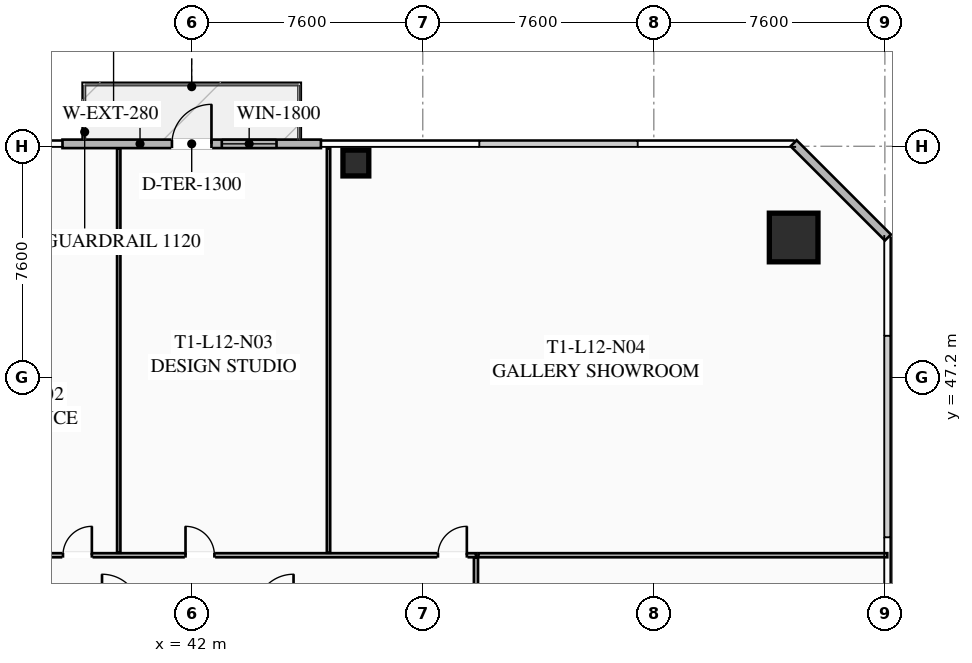
"""IFC4 building model, lengths in metres.
Left out: names, types, materials, properties, quantities, classifications, styles, units other than length and angle.
Written with IfcOpenShell. Run it as: python <this file> out.ifc"""

import sys

from ifc_helpers import new_model, si_unit, direction, frame, frame_2d, origin, origin_2d, place, context, subcontext, project, spatial, rectangle, hollow_rectangle, extrude, element, fill, save


model = new_model("IFC4")
c1 = context("Model", 3, precision=1e-05, world=origin(), true_north=direction((0.0, 1.0)))
c2 = subcontext(c1, "Body", "Model", "MODEL_VIEW")
j1 = project(units=[si_unit("LENGTHUNIT", "METRE"), si_unit("PLANEANGLEUNIT", "RADIAN")], contexts=[c1])
p1 = place(None, origin())
s1 = spatial("IfcSite", under=j1, at=p1, CompositionType="ELEMENT")
p2 = place(p1, origin())
s2 = spatial("IfcBuilding", under=s1, at=p2, CompositionType="ELEMENT")
p3 = place(p2, frame((0.0, 0.0, 49.45)))
s3 = spatial("IfcBuildingStorey", under=s2, at=p3, CompositionType="ELEMENT", Elevation=49.45)
p4 = place(p3, frame((61.8, 51.8, 0.0), z_axis=(0.0, 0.0, 1.0), x_axis=(1.0, 0.0, 0.0)))
e1 = element("IfcColumn", 1, at=p4, inside=s3, PredefinedType="COLUMN", context=c2, shape_type="SweptSolid", body=[
    extrude(hollow_rectangle(XDim=1.6, YDim=1.6, WallThickness=0.06, at=origin_2d()), origin(), (0.0, 0.0, 1.0), 3.35),
])
p5 = place(p3, frame((47.4, 54.25, 0.0), z_axis=(0.0, 0.0, 1.0), x_axis=(1.0, 0.0, 0.0)))
e2 = element("IfcColumn", 2, at=p5, inside=s3, PredefinedType="COLUMN", context=c2, shape_type="SweptSolid", body=[
    extrude(hollow_rectangle(XDim=0.85, YDim=0.85, WallThickness=0.035, at=origin_2d()), origin(), (0.0, 0.0, 1.0), 3.35),
])
p6 = place(p3, frame((37.75, 54.88, 0.0), z_axis=(0.0, 0.0, 1.0), x_axis=(1.0, 0.0, 0.0)))
e3 = element("IfcWall", 3, at=p6, inside=s3, PredefinedType="SOLIDWALL", context=c2, shape_type="SweptSolid", body=[
    extrude(rectangle(XDim=8.5, YDim=0.28, at=frame_2d((4.25, 0.0))), origin(), (0.0, 0.0, 1.0), 3.35),
])
p7 = place(p6, frame((3.6, 0.0, 0.0)))
e4 = element("IfcOpeningElement", 4, at=p7, cuts=e3, PredefinedType="OPENING", context=c2, shape_type="SweptSolid", body=[
    extrude(rectangle(XDim=1.3, YDim=2.15, at=frame_2d((0.65, 1.075))), frame((0.0, 0.15, 0.0), z_axis=(0.0, -1.0, 0.0), x_axis=(1.0, 0.0, 0.0)), (0.0, 0.0, 1.0), 0.3),
])
p8 = place(p6, frame((5.24, 0.0, 0.85)))
e5 = element("IfcOpeningElement", 5, at=p8, cuts=e3, PredefinedType="OPENING", context=c2, shape_type="SweptSolid", body=[
    extrude(rectangle(XDim=1.8, YDim=1.92, at=frame_2d((0.9, 0.96))), frame((0.0, 0.15, 0.0), z_axis=(0.0, -1.0, 0.0), x_axis=(1.0, 0.0, 0.0)), (0.0, 0.0, 1.0), 0.3),
])
p9 = place(p3, frame((61.8, 54.9, 0.0), z_axis=(0.0, 0.0, 1.0), x_axis=(0.707106781187, -0.707106781187, 0.0)))
e6 = element("IfcWall", 6, at=p9, inside=s3, PredefinedType="SOLIDWALL", context=c2, shape_type="SweptSolid", body=[
    extrude(rectangle(XDim=4.384, YDim=0.28, at=frame_2d((2.192, 0.0))), origin(), (0.0, 0.0, 1.0), 3.35),
])
p10 = place(p3, frame((22.35, 41.35, 0.0), z_axis=(0.0, 0.0, 1.0), x_axis=(1.0, 0.0, 0.0)))
e7 = element("IfcWall", 7, at=p10, inside=s3, PredefinedType="PARTITIONING", context=c2, shape_type="SweptSolid", body=[
    extrude(rectangle(XDim=29.0, YDim=0.135, at=frame_2d((14.5, 0.0))), origin(), (0.0, 0.0, 1.0), 2.703),
])
p11 = place(p10, frame((0.3, 0.0, 0.0)))
e8 = element("IfcOpeningElement", 8, at=p11, cuts=e7, PredefinedType="OPENING", context=c2, shape_type="SweptSolid", body=[
    extrude(rectangle(XDim=0.95, YDim=2.05, at=frame_2d((0.475, 1.025))), frame((0.0, 0.077, 0.0), z_axis=(0.0, -1.0, 0.0), x_axis=(1.0, 0.0, 0.0)), (0.0, 0.0, 1.0), 0.155),
])
p12 = place(p10, frame((15.416, 0.0, 0.0)))
e9 = element("IfcOpeningElement", 9, at=p12, cuts=e7, PredefinedType="OPENING", context=c2, shape_type="SweptSolid", body=[
    extrude(rectangle(XDim=0.95, YDim=2.05, at=frame_2d((0.475, 1.025))), frame((0.0, 0.077, 0.0), z_axis=(0.0, -1.0, 0.0), x_axis=(1.0, 0.0, 0.0)), (0.0, 0.0, 1.0), 0.155),
])
p13 = place(p10, frame((19.447, 0.0, 0.0)))
e10 = element("IfcOpeningElement", 10, at=p13, cuts=e7, PredefinedType="OPENING", context=c2, shape_type="SweptSolid", body=[
    extrude(rectangle(XDim=0.95, YDim=2.05, at=frame_2d((0.475, 1.025))), frame((0.0, 0.077, 0.0), z_axis=(0.0, -1.0, 0.0), x_axis=(1.0, 0.0, 0.0)), (0.0, 0.0, 1.0), 0.155),
])
p14 = place(p10, frame((27.75, 0.0, 0.0)))
e11 = element("IfcOpeningElement", 11, at=p14, cuts=e7, PredefinedType="OPENING", context=c2, shape_type="SweptSolid", body=[
    extrude(rectangle(XDim=0.95, YDim=2.05, at=frame_2d((0.475, 1.025))), frame((0.0, 0.077, 0.0), z_axis=(0.0, -1.0, 0.0), x_axis=(1.0, 0.0, 0.0)), (0.0, 0.0, 1.0), 0.155),
])
for number, where, z_axis, x_axis in (
    (12, (39.6, 41.43, 0.0), (0.0, 0.0, 1.0), (0.0, 1.0, 0.0)),
    (13, (46.5, 41.43, 0.0), (0.0, 0.0, 1.0), (0.0, 1.0, 0.0)),
):
    element("IfcWall", number, at=place(p3, frame(where, z_axis=z_axis, x_axis=x_axis)), inside=s3, PredefinedType="PARTITIONING", context=c2, shape_type="SweptSolid", body=[
        extrude(rectangle(XDim=13.3, YDim=0.11, at=frame_2d((6.65, 0.0))), origin(), (0.0, 0.0, 1.0), 2.703),
    ])
p15 = place(p3, frame((51.35, 41.27, 0.0), z_axis=(0.0, 0.0, 1.0), x_axis=(0.0, -1.0, 0.0)))
e14 = element("IfcWall", 14, at=p15, inside=s3, PredefinedType="PARTITIONING", context=c2, shape_type="SweptSolid", body=[
    extrude(rectangle(XDim=19.71, YDim=0.135, at=frame_2d((9.855, 0.0))), origin(), (0.0, 0.0, 1.0), 2.703),
])
p16 = place(p15, frame((18.46, 0.0, 0.0)))
e15 = element("IfcOpeningElement", 15, at=p16, cuts=e14, PredefinedType="OPENING", context=c2, shape_type="SweptSolid", body=[
    extrude(rectangle(XDim=0.95, YDim=2.05, at=frame_2d((0.475, 1.025))), frame((0.0, 0.077, 0.0), z_axis=(0.0, -1.0, 0.0), x_axis=(1.0, 0.0, 0.0)), (0.0, 0.0, 1.0), 0.155),
])
p17 = place(p15, frame((8.577, 0.0, 0.0)))
e16 = element("IfcOpeningElement", 16, at=p17, cuts=e14, PredefinedType="OPENING", context=c2, shape_type="SweptSolid", body=[
    extrude(rectangle(XDim=0.95, YDim=2.05, at=frame_2d((0.475, 1.025))), frame((0.0, 0.077, 0.0), z_axis=(0.0, -1.0, 0.0), x_axis=(1.0, 0.0, 0.0)), (0.0, 0.0, 1.0), 0.155),
])
p18 = place(p3, frame((64.88, 41.35, 0.0), z_axis=(0.0, 0.0, 1.0), x_axis=(-1.0, 0.0, 0.0)))
e17 = element("IfcWall", 17, at=p18, inside=s3, PredefinedType="PARTITIONING", context=c2, shape_type="SweptSolid", body=[
    extrude(rectangle(XDim=13.45, YDim=0.135, at=frame_2d((6.725, 0.0))), origin(), (0.0, 0.0, 1.0), 2.703),
])
p19 = place(p7, origin())
e18 = element("IfcDoor", 18, at=p19, inside=s3, OperationType="SINGLE_SWING_RIGHT", PredefinedType="DOOR", context=c2, shape_type="SweptSolid", body=[
    extrude(rectangle(XDim=1.3, YDim=2.15, at=frame_2d((0.65, 1.075))), frame((0.0, 0.025, 0.0), z_axis=(0.0, -1.0, 0.0), x_axis=(1.0, 0.0, 0.0)), (0.0, 0.0, 1.0), 0.05),
])
fill(e4, e18)
p20 = place(p8, origin())
e19 = element("IfcWindow", 19, at=p20, inside=s3, PartitioningType="SINGLE_PANEL", PredefinedType="WINDOW", context=c2, shape_type="SweptSolid", body=[
    extrude(rectangle(XDim=1.8, YDim=1.92, at=frame_2d((0.9, 0.96))), frame((0.0, 0.03, 0.0), z_axis=(0.0, -1.0, 0.0), x_axis=(1.0, 0.0, 0.0)), (0.0, 0.0, 1.0), 0.06),
])
fill(e5, e19)
p21 = place(p12, origin())
e20 = element("IfcDoor", 20, at=p21, inside=s3, OperationType="SINGLE_SWING_RIGHT", PredefinedType="DOOR", context=c2, shape_type="SweptSolid", body=[
    extrude(rectangle(XDim=0.95, YDim=2.05, at=frame_2d((0.475, 1.025))), frame((0.0, 0.025, 0.0), z_axis=(0.0, -1.0, 0.0), x_axis=(1.0, 0.0, 0.0)), (0.0, 0.0, 1.0), 0.05),
])
fill(e9, e20)
p22 = place(p13, origin())
e21 = element("IfcDoor", 21, at=p22, inside=s3, OperationType="SINGLE_SWING_LEFT", PredefinedType="DOOR", context=c2, shape_type="SweptSolid", body=[
    extrude(rectangle(XDim=0.95, YDim=2.05, at=frame_2d((0.475, 1.025))), frame((0.0, 0.025, 0.0), z_axis=(0.0, -1.0, 0.0), x_axis=(1.0, 0.0, 0.0)), (0.0, 0.0, 1.0), 0.05),
])
fill(e10, e21)
p23 = place(p14, origin())
e22 = element("IfcDoor", 22, at=p23, inside=s3, OperationType="SINGLE_SWING_RIGHT", PredefinedType="DOOR", context=c2, shape_type="SweptSolid", body=[
    extrude(rectangle(XDim=0.95, YDim=2.05, at=frame_2d((0.475, 1.025))), frame((0.0, 0.025, 0.0), z_axis=(0.0, -1.0, 0.0), x_axis=(1.0, 0.0, 0.0)), (0.0, 0.0, 1.0), 0.05),
])
fill(e11, e22)
save(model, sys.argv[1])
